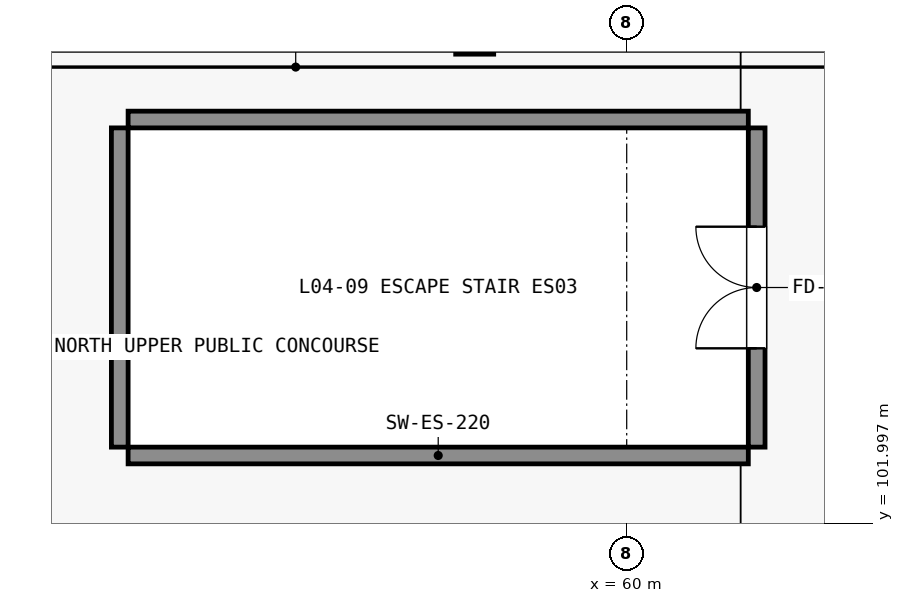
"""IFC4 building model, lengths in metres.
Left out: names, types, materials, properties, quantities, classifications, styles, units other than length and angle.
Written with IfcOpenShell. Run it as: python <this file> out.ifc"""

import sys

from ifc_helpers import new_model, si_unit, direction, frame, frame_2d, origin, origin_2d, place, context, subcontext, project, spatial, rectangle, extrude, element, fill, save


model = new_model("IFC4")
c1 = context("Model", 3, precision=1e-05, world=origin(), true_north=direction((0.0, 1.0)))
c2 = subcontext(c1, "Body", "Model", "MODEL_VIEW")
j1 = project(units=[si_unit("LENGTHUNIT", "METRE"), si_unit("PLANEANGLEUNIT", "RADIAN")], contexts=[c1])
p1 = place(None, origin())
s1 = spatial("IfcSite", under=j1, at=p1, CompositionType="ELEMENT")
p2 = place(p1, origin())
s2 = spatial("IfcBuilding", under=s1, at=p2, CompositionType="ELEMENT")
p3 = place(p2, frame((0.0, 0.0, 21.0)))
s3 = spatial("IfcBuildingStorey", under=s2, at=p3, CompositionType="ELEMENT", Elevation=21.0)
p4 = place(p3, frame((58.0, 108.42, -0.34), z_axis=(0.0, 0.0, 1.0), x_axis=(1.0, 0.0, 0.0)))
e1 = element("IfcColumn", 1, at=p4, inside=s3, PredefinedType="PILASTER", context=c2, shape_type="SweptSolid", body=[
    extrude(rectangle(XDim=0.5, YDim=0.5, at=origin_2d()), origin(), (0.0, 0.0, 1.0), 1.69),
])
for number, where, z_axis, x_axis in (
    (2, (53.44, 102.89, 0.0), (0.0, 0.0, 1.0), (1.0, 0.0, 0.0)),
    (3, (53.44, 107.31, 0.0), (0.0, 0.0, 1.0), (1.0, 0.0, 0.0)),
):
    element("IfcWall", number, at=place(p3, frame(where, z_axis=z_axis, x_axis=x_axis)), inside=s3, PredefinedType="SHEAR", context=c2, shape_type="SweptSolid", body=[
        extrude(rectangle(XDim=8.16, YDim=0.22, at=frame_2d((4.08, 0.0))), origin(), (0.0, 0.0, 1.0), 5.06),
    ])
p5 = place(p3, frame((53.33, 103.0, 0.0), z_axis=(0.0, 0.0, 1.0), x_axis=(0.0, 1.0, 0.0)))
e4 = element("IfcWall", 4, at=p5, inside=s3, PredefinedType="SHEAR", context=c2, shape_type="SweptSolid", body=[
    extrude(rectangle(XDim=4.2, YDim=0.22, at=frame_2d((2.1, 0.0))), origin(), (0.0, 0.0, 1.0), 5.06),
])
p6 = place(p3, frame((61.71, 103.0, 0.0), z_axis=(0.0, 0.0, 1.0), x_axis=(0.0, 1.0, 0.0)))
e5 = element("IfcWall", 5, at=p6, inside=s3, PredefinedType="SHEAR", context=c2, shape_type="SweptSolid", body=[
    extrude(rectangle(XDim=4.2, YDim=0.22, at=frame_2d((2.1, 0.0))), origin(), (0.0, 0.0, 1.0), 5.06),
])
p7 = place(p6, frame((1.3, 0.0, 0.0)))
e6 = element("IfcOpeningElement", 6, at=p7, cuts=e5, PredefinedType="OPENING", context=c2, shape_type="SweptSolid", body=[
    extrude(rectangle(XDim=1.6, YDim=2.2, at=frame_2d((0.8, 1.1))), frame((0.0, 0.12, 0.0), z_axis=(0.0, -1.0, 0.0), x_axis=(1.0, 0.0, 0.0)), (0.0, 0.0, 1.0), 0.24),
])
p8 = place(p7, origin())
e7 = element("IfcDoor", 7, at=p8, inside=s3, OperationType="DOUBLE_DOOR_SINGLE_SWING", PredefinedType="DOOR", context=c2, shape_type="SweptSolid", body=[
    extrude(rectangle(XDim=1.6, YDim=2.2, at=frame_2d((0.8, 1.1))), frame((0.0, 0.025, 0.0), z_axis=(0.0, -1.0, 0.0), x_axis=(1.0, 0.0, 0.0)), (0.0, 0.0, 1.0), 0.05),
])
fill(e6, e7)
save(model, sys.argv[1])
